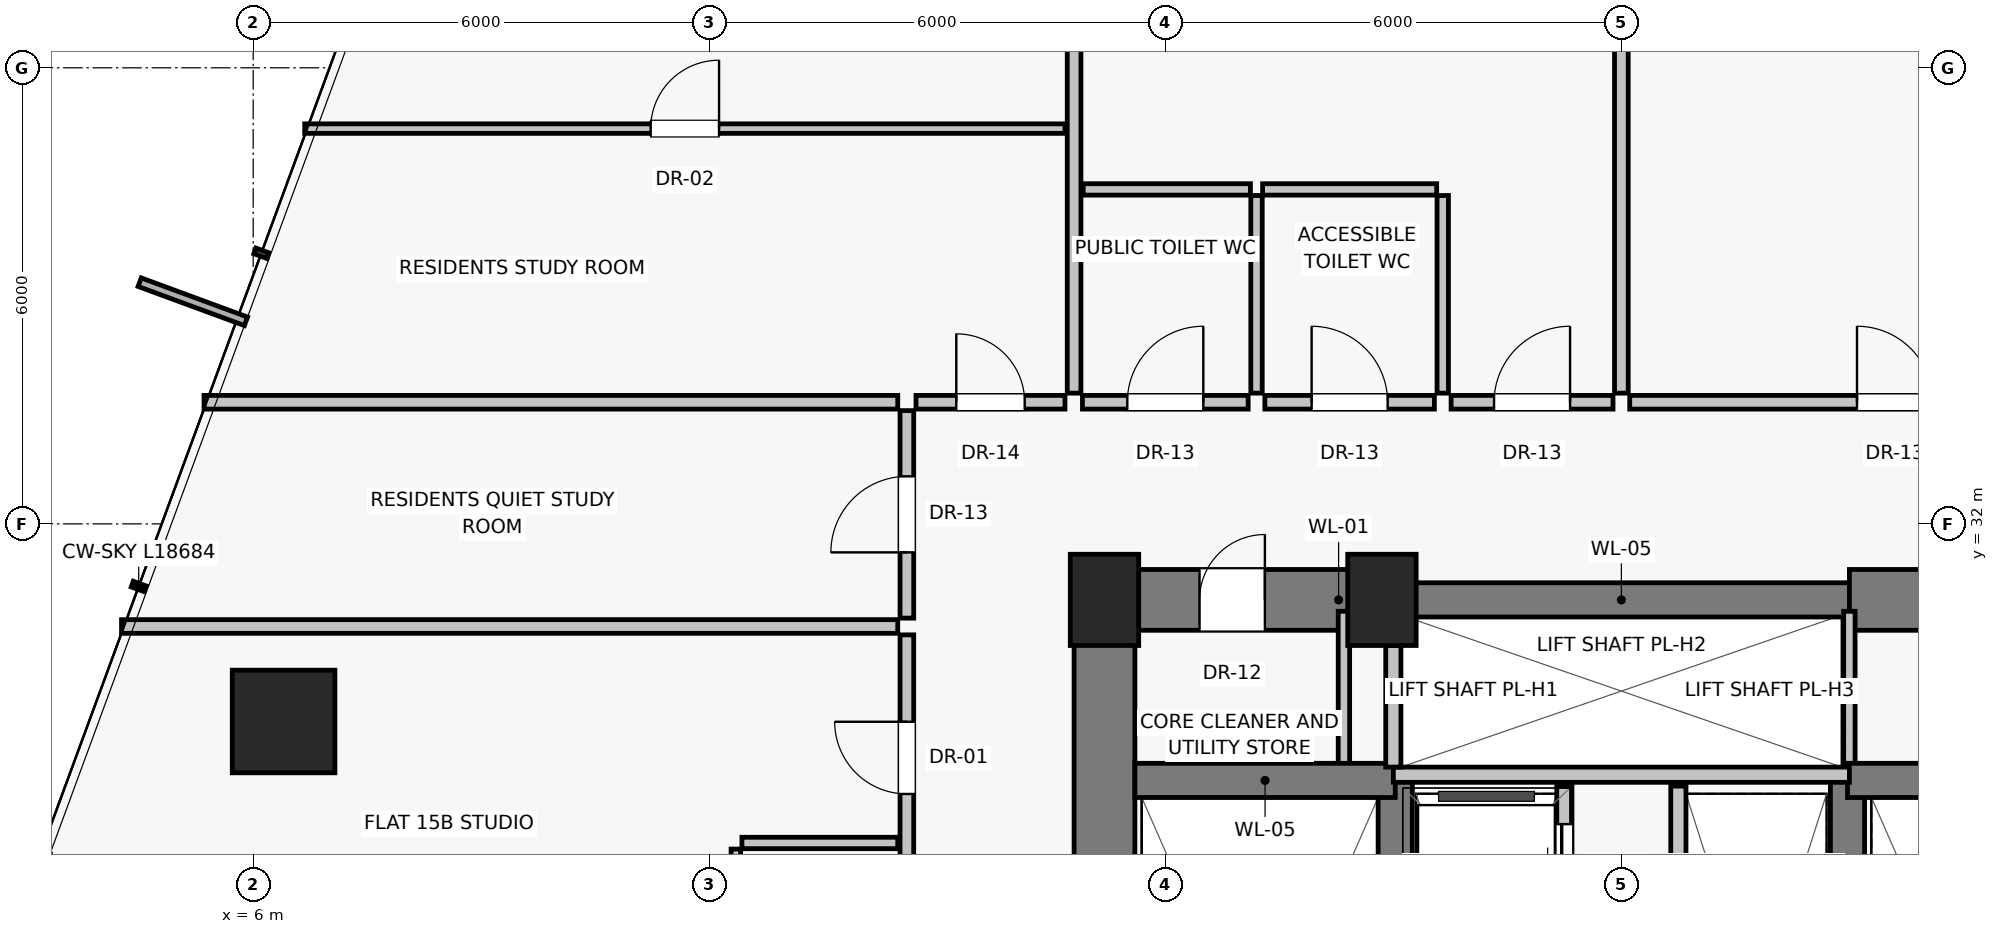
"""IFC4 building model, lengths in metres.
Left out: names, types, materials, properties, quantities, classifications, styles, units other than length and angle.
Written with IfcOpenShell. Run it as: python <this file> out.ifc"""

import sys

from ifc_helpers import new_model, si_unit, direction, frame, frame_2d, origin, origin_2d, place, context, subcontext, project, spatial, rectangle, extrude, source, transform, mapped, element, fill, save


model = new_model("IFC4")
c1 = context("Model", 3, precision=1e-05, world=origin(), true_north=direction((0.0, 1.0)))
c2 = subcontext(c1, "Body", "Model", "MODEL_VIEW")
j1 = project(units=[si_unit("LENGTHUNIT", "METRE"), si_unit("PLANEANGLEUNIT", "RADIAN")], contexts=[c1])
p1 = place(None, origin())
s1 = spatial("IfcSite", under=j1, at=p1, CompositionType="ELEMENT")
p2 = place(p1, origin())
s2 = spatial("IfcBuilding", under=s1, at=p2, CompositionType="ELEMENT")
p3 = place(p2, frame((0.0, 0.0, 56.55)))
s3 = spatial("IfcBuildingStorey", under=s2, at=p3, CompositionType="ELEMENT", Elevation=56.55)
for number, where, z_axis, x_axis in (
    (1, (17.2, 31.0, 0.0), (0.0, 0.0, 1.0), (1.0, 0.0, 0.0)),
    (2, (20.85, 31.0, 0.0), (0.0, 0.0, 1.0), (1.0, 0.0, 0.0)),
):
    element("IfcColumn", number, at=place(p3, frame(where, z_axis=z_axis, x_axis=x_axis)), inside=s3, PredefinedType="PILASTER", context=c2, shape_type="SweptSolid", body=[
        extrude(rectangle(XDim=0.9, YDim=1.2, at=origin_2d()), origin(), (0.0, 0.0, 1.0), 4.3),
    ])
p4 = place(p3, frame((6.4, 29.4, 0.0), z_axis=(0.0, 0.0, 1.0), x_axis=(1.0, 0.0, 0.0)))
e3 = element("IfcColumn", 3, at=p4, inside=s3, PredefinedType="COLUMN", context=c2, shape_type="SweptSolid", body=[
    extrude(rectangle(XDim=1.35, YDim=1.35, at=origin_2d()), origin(), (0.0, 0.0, 1.0), 4.3),
])
p5 = place(p3, frame((17.2, 16.8, 0.0), z_axis=(0.0, 0.0, 1.0), x_axis=(0.0, 1.0, 0.0)))
e4 = element("IfcWall", 4, at=p5, inside=s3, PredefinedType="SHEAR", context=c2, shape_type="SweptSolid", body=[
    extrude(rectangle(XDim=14.2, YDim=0.8, at=frame_2d((7.1, 0.0))), origin(), (0.0, 0.0, 1.0), 4.05),
])
p6 = place(p3, frame((17.2, 31.0, 0.0), z_axis=(0.0, 0.0, 1.0), x_axis=(1.0, 0.0, 0.0)))
e5 = element("IfcWall", 5, at=p6, inside=s3, PredefinedType="SHEAR", context=c2, shape_type="SweptSolid", body=[
    extrude(rectangle(XDim=3.8, YDim=0.8, at=frame_2d((1.9, 0.0))), origin(), (0.0, 0.0, 1.0), 4.05),
])
p7 = place(p6, frame((1.25, 0.0, 0.0)))
e6 = element("IfcOpeningElement", 6, at=p7, cuts=e5, PredefinedType="OPENING", context=c2, shape_type="SweptSolid", body=[
    extrude(rectangle(XDim=0.86, YDim=2.01, at=frame_2d((0.43, 1.005))), frame((0.0, 0.41, 0.0), z_axis=(0.0, -1.0, 0.0), x_axis=(1.0, 0.0, 0.0)), (0.0, 0.0, 1.0), 0.82),
])
p8 = place(p3, frame((21.0, 31.0, 0.0), z_axis=(0.0, 0.0, 1.0), x_axis=(1.0, 0.0, 0.0)))
e7 = element("IfcWall", 7, at=p8, inside=s3, PredefinedType="SHEAR", context=c2, shape_type="SweptSolid", body=[
    extrude(rectangle(XDim=6.0, YDim=0.45, at=frame_2d((3.0, 0.0))), origin(), (0.0, 0.0, 1.0), 4.05),
])
p9 = place(p3, frame((27.0, 31.0, 0.0), z_axis=(0.0, 0.0, 1.0), x_axis=(1.0, 0.0, 0.0)))
e8 = element("IfcWall", 8, at=p9, inside=s3, PredefinedType="SHEAR", context=c2, shape_type="SweptSolid", body=[
    extrude(rectangle(XDim=3.8, YDim=0.8, at=frame_2d((1.9, 0.0))), origin(), (0.0, 0.0, 1.0), 4.05),
])
p10 = place(p9, frame((1.15, 0.0, 0.0)))
e9 = element("IfcOpeningElement", 9, at=p10, cuts=e8, PredefinedType="OPENING", context=c2, shape_type="SweptSolid", body=[
    extrude(rectangle(XDim=1.0, YDim=2.01, at=frame_2d((0.5, 1.005))), frame((0.0, 0.41, 0.0), z_axis=(0.0, -1.0, 0.0), x_axis=(1.0, 0.0, 0.0)), (0.0, 0.0, 1.0), 0.82),
])
for number, where, z_axis, x_axis in (
    (10, (20.35, 28.65, 0.0), (0.0, 0.0, 1.0), (0.0, 1.0, 0.0)),
    (11, (27.0, 28.65, 0.0), (0.0, 0.0, 1.0), (0.0, 1.0, 0.0)),
):
    element("IfcWall", number, at=place(p3, frame(where, z_axis=z_axis, x_axis=x_axis)), inside=s3, PredefinedType="PARTITIONING", context=c2, shape_type="SweptSolid", body=[
        extrude(rectangle(XDim=2.2, YDim=0.15, at=frame_2d((1.1, 0.0))), origin(), (0.0, 0.0, 1.0), 4.05),
    ])
for number, where, z_axis, x_axis in (
    (12, (21.025, 19.8, 0.0), (0.0, 0.0, 1.0), (0.0, 1.0, 0.0)),
    (13, (26.975, 19.8, 0.0), (0.0, 0.0, 1.0), (0.0, 1.0, 0.0)),
):
    element("IfcWall", number, at=place(p3, frame(where, z_axis=z_axis, x_axis=x_axis)), inside=s3, PredefinedType="SHEAR", context=c2, shape_type="SweptSolid", body=[
        extrude(rectangle(XDim=8.825, YDim=0.45, at=frame_2d((4.413, 0.0))), origin(), (0.0, 0.0, 1.0), 4.05),
    ])
for number, where, z_axis, x_axis in (
    (14, (17.6, 28.625, 0.0), (0.0, 0.0, 1.0), (1.0, 0.0, 0.0)),
    (15, (26.975, 28.625, 0.0), (0.0, 0.0, 1.0), (1.0, 0.0, 0.0)),
):
    element("IfcWall", number, at=place(p3, frame(where, z_axis=z_axis, x_axis=x_axis)), inside=s3, PredefinedType="SHEAR", context=c2, shape_type="SweptSolid", body=[
        extrude(rectangle(XDim=3.425, YDim=0.45, at=frame_2d((1.712, 0.0))), origin(), (0.0, 0.0, 1.0), 4.05),
    ])
p11 = place(p3, frame((21.0, 28.7, 0.0), z_axis=(0.0, 0.0, 1.0), x_axis=(1.0, 0.0, 0.0)))
e16 = element("IfcWall", 16, at=p11, inside=s3, PredefinedType="SOLIDWALL", context=c2, shape_type="SweptSolid", body=[
    extrude(rectangle(XDim=6.0, YDim=0.2, at=frame_2d((3.0, 0.0))), origin(), (0.0, 0.0, 1.0), 4.05),
])
p12 = place(p3, frame((21.0, 28.8, 0.0), z_axis=(0.0, 0.0, 1.0), x_axis=(0.0, 1.0, 0.0)))
e17 = element("IfcWall", 17, at=p12, inside=s3, PredefinedType="SOLIDWALL", context=c2, shape_type="SweptSolid", body=[
    extrude(rectangle(XDim=1.6, YDim=0.2, at=frame_2d((0.8, 0.0))), origin(), (0.0, 0.0, 1.0), 4.05),
])
p13 = place(p3, frame((23.25, 22.6, 0.0), z_axis=(0.0, 0.0, 1.0), x_axis=(0.0, 1.0, 0.0)))
e18 = element("IfcWall", 18, at=p13, inside=s3, PredefinedType="SOLIDWALL", context=c2, shape_type="SweptSolid", body=[
    extrude(rectangle(XDim=5.95, YDim=0.2, at=frame_2d((2.975, 0.0))), origin(), (0.0, 0.0, 1.0), 4.05),
])
p14 = place(p13, frame((0.45, 0.0, 0.0)))
e19 = element("IfcOpeningElement", 19, at=p14, cuts=e18, PredefinedType="OPENING", context=c2, shape_type="SweptSolid", body=[
    extrude(rectangle(XDim=1.1, YDim=2.08, at=frame_2d((0.55, 1.04))), frame((0.0, 0.11, 0.0), z_axis=(0.0, -1.0, 0.0), x_axis=(1.0, 0.0, 0.0)), (0.0, 0.0, 1.0), 0.22),
])
p15 = place(p13, frame((2.4, 0.0, 0.0)))
e20 = element("IfcOpeningElement", 20, at=p15, cuts=e18, PredefinedType="OPENING", context=c2, shape_type="SweptSolid", body=[
    extrude(rectangle(XDim=1.1, YDim=2.08, at=frame_2d((0.55, 1.04))), frame((0.0, 0.11, 0.0), z_axis=(0.0, -1.0, 0.0), x_axis=(1.0, 0.0, 0.0)), (0.0, 0.0, 1.0), 0.22),
])
p16 = place(p13, frame((4.35, 0.0, 0.0)))
e21 = element("IfcOpeningElement", 21, at=p16, cuts=e18, PredefinedType="OPENING", context=c2, shape_type="SweptSolid", body=[
    extrude(rectangle(XDim=1.1, YDim=2.08, at=frame_2d((0.55, 1.04))), frame((0.0, 0.11, 0.0), z_axis=(0.0, -1.0, 0.0), x_axis=(1.0, 0.0, 0.0)), (0.0, 0.0, 1.0), 0.22),
])
p17 = place(p3, frame((24.75, 22.6, 0.0), z_axis=(0.0, 0.0, 1.0), x_axis=(0.0, 1.0, 0.0)))
e22 = element("IfcWall", 22, at=p17, inside=s3, PredefinedType="SOLIDWALL", context=c2, shape_type="SweptSolid", body=[
    extrude(rectangle(XDim=5.95, YDim=0.2, at=frame_2d((2.975, 0.0))), origin(), (0.0, 0.0, 1.0), 4.05),
])
p18 = place(p3, frame((16.8, 33.72, 0.0), z_axis=(0.0, 0.0, 1.0), x_axis=(0.0, 1.0, 0.0)))
e23 = element("IfcWall", 23, at=p18, inside=s3, PredefinedType="PARTITIONING", context=c2, shape_type="SweptSolid", body=[
    extrude(rectangle(XDim=10.159, YDim=0.18, at=frame_2d((5.08, 0.0))), origin(), (0.0, 0.0, 1.0), 4.05),
])
p19 = place(p3, frame((16.91, 33.6, 0.0), z_axis=(0.0, 0.0, 1.0), x_axis=(1.0, 0.0, 0.0)))
e24 = element("IfcWall", 24, at=p19, inside=s3, PredefinedType="PARTITIONING", context=c2, shape_type="SweptSolid", body=[
    extrude(rectangle(XDim=2.18, YDim=0.18, at=frame_2d((1.09, 0.0))), origin(), (0.0, 0.0, 1.0), 4.05),
])
p20 = place(p19, frame((0.59, 0.0, 0.0)))
e25 = element("IfcOpeningElement", 25, at=p20, cuts=e24, PredefinedType="OPENING", context=c2, shape_type="SweptSolid", body=[
    extrude(rectangle(XDim=1.0, YDim=2.01, at=frame_2d((0.5, 1.005))), frame((0.0, 0.1, 0.0), z_axis=(0.0, -1.0, 0.0), x_axis=(1.0, 0.0, 0.0)), (0.0, 0.0, 1.0), 0.2),
])
p21 = place(p3, frame((19.31, 33.6, 0.0), z_axis=(0.0, 0.0, 1.0), x_axis=(1.0, 0.0, 0.0)))
e26 = element("IfcWall", 26, at=p21, inside=s3, PredefinedType="PARTITIONING", context=c2, shape_type="SweptSolid", body=[
    extrude(rectangle(XDim=2.23, YDim=0.18, at=frame_2d((1.115, 0.0))), origin(), (0.0, 0.0, 1.0), 4.05),
])
p22 = place(p21, frame((0.615, 0.0, 0.0)))
e27 = element("IfcOpeningElement", 27, at=p22, cuts=e26, PredefinedType="OPENING", context=c2, shape_type="SweptSolid", body=[
    extrude(rectangle(XDim=1.0, YDim=2.01, at=frame_2d((0.5, 1.005))), frame((0.0, 0.1, 0.0), z_axis=(0.0, -1.0, 0.0), x_axis=(1.0, 0.0, 0.0)), (0.0, 0.0, 1.0), 0.2),
])
p23 = place(p3, frame((21.76, 33.6, 0.0), z_axis=(0.0, 0.0, 1.0), x_axis=(1.0, 0.0, 0.0)))
e28 = element("IfcWall", 28, at=p23, inside=s3, PredefinedType="PARTITIONING", context=c2, shape_type="SweptSolid", body=[
    extrude(rectangle(XDim=2.13, YDim=0.18, at=frame_2d((1.065, 0.0))), origin(), (0.0, 0.0, 1.0), 4.05),
])
p24 = place(p23, frame((0.565, 0.0, 0.0)))
e29 = element("IfcOpeningElement", 29, at=p24, cuts=e28, PredefinedType="OPENING", context=c2, shape_type="SweptSolid", body=[
    extrude(rectangle(XDim=1.0, YDim=2.01, at=frame_2d((0.5, 1.005))), frame((0.0, 0.1, 0.0), z_axis=(0.0, -1.0, 0.0), x_axis=(1.0, 0.0, 0.0)), (0.0, 0.0, 1.0), 0.2),
])
p25 = place(p3, frame((24.11, 33.6, 0.0), z_axis=(0.0, 0.0, 1.0), x_axis=(1.0, 0.0, 0.0)))
e30 = element("IfcWall", 30, at=p25, inside=s3, PredefinedType="PARTITIONING", context=c2, shape_type="SweptSolid", body=[
    extrude(rectangle(XDim=6.98, YDim=0.18, at=frame_2d((3.49, 0.0))), origin(), (0.0, 0.0, 1.0), 4.05),
])
p26 = place(p25, frame((2.99, 0.0, 0.0)))
e31 = element("IfcOpeningElement", 31, at=p26, cuts=e30, PredefinedType="OPENING", context=c2, shape_type="SweptSolid", body=[
    extrude(rectangle(XDim=1.0, YDim=2.01, at=frame_2d((0.5, 1.005))), frame((0.0, 0.1, 0.0), z_axis=(0.0, -1.0, 0.0), x_axis=(1.0, 0.0, 0.0)), (0.0, 0.0, 1.0), 0.2),
])
for number, where, z_axis, x_axis in (
    (32, (19.2, 33.72, 0.0), (0.0, 0.0, 1.0), (0.0, 1.0, 0.0)),
    (33, (21.65, 33.72, 0.0), (0.0, 0.0, 1.0), (0.0, 1.0, 0.0)),
):
    element("IfcWall", number, at=place(p3, frame(where, z_axis=z_axis, x_axis=x_axis)), inside=s3, PredefinedType="PARTITIONING", context=c2, shape_type="SweptSolid", body=[
        extrude(rectangle(XDim=2.6, YDim=0.15, at=frame_2d((1.3, 0.0))), origin(), (0.0, 0.0, 1.0), 4.05),
    ])
p27 = place(p3, frame((16.92, 36.4, 0.0), z_axis=(0.0, 0.0, 1.0), x_axis=(1.0, 0.0, 0.0)))
e34 = element("IfcWall", 34, at=p27, inside=s3, PredefinedType="PARTITIONING", context=c2, shape_type="SweptSolid", body=[
    extrude(rectangle(XDim=2.2, YDim=0.15, at=frame_2d((1.1, 0.0))), origin(), (0.0, 0.0, 1.0), 3.63),
])
p28 = place(p3, frame((19.28, 36.4, 0.0), z_axis=(0.0, 0.0, 1.0), x_axis=(1.0, 0.0, 0.0)))
e35 = element("IfcWall", 35, at=p28, inside=s3, PredefinedType="PARTITIONING", context=c2, shape_type="SweptSolid", body=[
    extrude(rectangle(XDim=2.29, YDim=0.15, at=frame_2d((1.145, 0.0))), origin(), (0.0, 0.0, 1.0), 3.63),
])
p29 = place(p3, frame((24.0, 33.72, 0.0), z_axis=(0.0, 0.0, 1.0), x_axis=(0.0, 1.0, 0.0)))
e36 = element("IfcWall", 36, at=p29, inside=s3, PredefinedType="PARTITIONING", context=c2, shape_type="SweptSolid", body=[
    extrude(rectangle(XDim=11.403, YDim=0.18, at=frame_2d((5.701, 0.0))), origin(), (0.0, 0.0, 1.0), 4.05),
])
p30 = place(p3, frame((14.48, 33.6, 0.0), z_axis=(0.0, 0.0, 1.0), x_axis=(-1.0, 0.0, 0.0)))
e37 = element("IfcWall", 37, at=p30, inside=s3, PredefinedType="PARTITIONING", context=c2, shape_type="SweptSolid", body=[
    extrude(rectangle(XDim=9.126, YDim=0.18, at=frame_2d((4.563, 0.0))), origin(), (0.0, 0.0, 1.0), 4.05),
])
p31 = place(p3, frame((14.6, 30.76, 0.0), z_axis=(0.0, 0.0, 1.0), x_axis=(0.0, 1.0, 0.0)))
e38 = element("IfcWall", 38, at=p31, inside=s3, PredefinedType="PARTITIONING", context=c2, shape_type="SweptSolid", body=[
    extrude(rectangle(XDim=2.73, YDim=0.18, at=frame_2d((1.365, 0.0))), origin(), (0.0, 0.0, 1.0), 4.05),
])
p32 = place(p31, frame((0.865, 0.0, 0.0)))
e39 = element("IfcOpeningElement", 39, at=p32, cuts=e38, PredefinedType="OPENING", context=c2, shape_type="SweptSolid", body=[
    extrude(rectangle(XDim=1.0, YDim=2.01, at=frame_2d((0.5, 1.005))), frame((0.0, 0.1, 0.0), z_axis=(0.0, -1.0, 0.0), x_axis=(1.0, 0.0, 0.0)), (0.0, 0.0, 1.0), 0.2),
])
p33 = place(p3, frame((14.48, 30.65, 0.0), z_axis=(0.0, 0.0, 1.0), x_axis=(-1.0, 0.0, 0.0)))
e40 = element("IfcWall", 40, at=p33, inside=s3, PredefinedType="PARTITIONING", context=c2, shape_type="SweptSolid", body=[
    extrude(rectangle(XDim=10.212, YDim=0.18, at=frame_2d((5.106, 0.0))), origin(), (0.0, 0.0, 1.0), 3.271),
])
p34 = place(p3, frame((14.6, 25.562, 0.0), z_axis=(0.0, 0.0, 1.0), x_axis=(0.0, 1.0, 0.0)))
e41 = element("IfcWall", 41, at=p34, inside=s3, PredefinedType="PARTITIONING", context=c2, shape_type="SweptSolid", body=[
    extrude(rectangle(XDim=4.978, YDim=0.18, at=frame_2d((2.489, 0.0))), origin(), (0.0, 0.0, 1.0), 4.05),
])
p35 = place(p34, frame((2.885, 0.0, 0.0)))
e42 = element("IfcOpeningElement", 42, at=p35, cuts=e41, PredefinedType="OPENING", context=c2, shape_type="SweptSolid", body=[
    extrude(rectangle(XDim=0.95, YDim=2.02, at=frame_2d((0.475, 1.01))), frame((0.0, 0.1, 0.0), z_axis=(0.0, -1.0, 0.0), x_axis=(1.0, 0.0, 0.0)), (0.0, 0.0, 1.0), 0.2),
])
p36 = place(p3, frame((14.48, 27.802, 0.0), z_axis=(0.0, 0.0, 1.0), x_axis=(-1.0, 0.0, 0.0)))
e43 = element("IfcWall", 43, at=p36, inside=s3, PredefinedType="PARTITIONING", context=c2, shape_type="SweptSolid", body=[
    extrude(rectangle(XDim=2.05, YDim=0.15, at=frame_2d((1.025, 0.0))), origin(), (0.0, 0.0, 1.0), 4.05),
])
p37 = place(p3, frame((12.35, 25.572, 0.0), z_axis=(0.0, 0.0, 1.0), x_axis=(0.0, 1.0, 0.0)))
e44 = element("IfcWall", 44, at=p37, inside=s3, PredefinedType="PARTITIONING", context=c2, shape_type="SweptSolid", body=[
    extrude(rectangle(XDim=2.15, YDim=0.125, at=frame_2d((1.075, 0.0))), origin(), (0.0, 0.0, 1.0), 4.05),
])
p38 = place(p37, frame((0.645, 0.0, 0.0)))
e45 = element("IfcOpeningElement", 45, at=p38, cuts=e44, PredefinedType="OPENING", context=c2, shape_type="SweptSolid", body=[
    extrude(rectangle(XDim=0.86, YDim=2.01, at=frame_2d((0.43, 1.005))), frame((0.0, 0.073, 0.0), z_axis=(0.0, -1.0, 0.0), x_axis=(1.0, 0.0, 0.0)), (0.0, 0.0, 1.0), 0.145),
])
p39 = place(p3, frame((14.72, 33.6, 0.0), z_axis=(0.0, 0.0, 1.0), x_axis=(1.0, 0.0, 0.0)))
e46 = element("IfcWall", 46, at=p39, inside=s3, PredefinedType="PARTITIONING", context=c2, shape_type="SweptSolid", body=[
    extrude(rectangle(XDim=1.96, YDim=0.18, at=frame_2d((0.98, 0.0))), origin(), (0.0, 0.0, 1.0), 4.05),
])
p40 = place(p39, frame((0.53, 0.0, 0.0)))
e47 = element("IfcOpeningElement", 47, at=p40, cuts=e46, PredefinedType="OPENING", context=c2, shape_type="SweptSolid", body=[
    extrude(rectangle(XDim=0.9, YDim=2.01, at=frame_2d((0.45, 1.005))), frame((0.0, 0.1, 0.0), z_axis=(0.0, -1.0, 0.0), x_axis=(1.0, 0.0, 0.0)), (0.0, 0.0, 1.0), 0.2),
])
p41 = place(p3, frame((6.678, 37.2, 0.0), z_axis=(0.0, 0.0, 1.0), x_axis=(1.0, 0.0, 0.0)))
e48 = element("IfcWall", 48, at=p41, inside=s3, PredefinedType="PARTITIONING", context=c2, shape_type="SweptSolid", body=[
    extrude(rectangle(XDim=10.002, YDim=0.125, at=frame_2d((5.001, 0.0))), origin(), (0.0, 0.0, 1.0), 4.05),
])
p42 = place(p41, frame((4.551, 0.0, 0.0)))
e49 = element("IfcOpeningElement", 49, at=p42, cuts=e48, PredefinedType="OPENING", context=c2, shape_type="SweptSolid", body=[
    extrude(rectangle(XDim=0.9, YDim=2.01, at=frame_2d((0.45, 1.005))), frame((0.0, 0.073, 0.0), z_axis=(0.0, -1.0, 0.0), x_axis=(1.0, 0.0, 0.0)), (0.0, 0.0, 1.0), 0.145),
])
m1 = source(origin(), c2, "Body", "SweptSolid", [
    extrude(rectangle(XDim=0.86, YDim=2.01, at=frame_2d((0.43, 1.005))), frame((0.0, 0.025, 0.0), z_axis=(0.0, -1.0, 0.0), x_axis=(1.0, 0.0, 0.0)), (0.0, 0.0, 1.0), 0.05),
])
p43 = place(p7, origin())
e50 = element("IfcDoor", 50, at=p43, inside=s3, OperationType="SINGLE_SWING_RIGHT", PredefinedType="DOOR", context=c2, shape_type="MappedRepresentation", body=[
    mapped(m1, transform((0.0, 0.0, 0.0), scale=1.0)),
])
fill(e6, e50)
m2 = source(origin(), c2, "Body", "SweptSolid", [
    extrude(rectangle(XDim=1.1, YDim=2.08, at=frame_2d((0.55, 1.04))), frame((0.0, 0.025, 0.0), z_axis=(0.0, -1.0, 0.0), x_axis=(1.0, 0.0, 0.0)), (0.0, 0.0, 1.0), 0.05),
])
p44 = place(p16, origin())
e51 = element("IfcDoor", 51, at=p44, inside=s3, OperationType="SLIDING_TO_LEFT", PredefinedType="DOOR", context=c2, shape_type="MappedRepresentation", body=[
    mapped(m2, transform((0.0, 0.0, 0.0), scale=1.0)),
])
fill(e21, e51)
m3 = source(origin(), c2, "Body", "SweptSolid", [
    extrude(rectangle(XDim=1.0, YDim=2.01, at=frame_2d((0.5, 1.005))), frame((0.0, 0.025, 0.0), z_axis=(0.0, -1.0, 0.0), x_axis=(1.0, 0.0, 0.0)), (0.0, 0.0, 1.0), 0.05),
])
p45 = place(p20, origin())
e52 = element("IfcDoor", 52, at=p45, inside=s3, OperationType="SINGLE_SWING_RIGHT", PredefinedType="DOOR", context=c2, shape_type="MappedRepresentation", body=[
    mapped(m3, transform((0.0, 0.0, 0.0), scale=1.0)),
])
fill(e25, e52)
p46 = place(p22, origin())
e53 = element("IfcDoor", 53, at=p46, inside=s3, OperationType="SINGLE_SWING_LEFT", PredefinedType="DOOR", context=c2, shape_type="MappedRepresentation", body=[
    mapped(m3, transform((0.0, 0.0, 0.0), scale=1.0)),
])
fill(e27, e53)
p47 = place(p24, origin())
e54 = element("IfcDoor", 54, at=p47, inside=s3, OperationType="SINGLE_SWING_RIGHT", PredefinedType="DOOR", context=c2, shape_type="MappedRepresentation", body=[
    mapped(m3, transform((0.0, 0.0, 0.0), scale=1.0)),
])
fill(e29, e54)
p48 = place(p26, origin())
e55 = element("IfcDoor", 55, at=p48, inside=s3, OperationType="SINGLE_SWING_LEFT", PredefinedType="DOOR", context=c2, shape_type="MappedRepresentation", body=[
    mapped(m3, transform((0.0, 0.0, 0.0), scale=1.0)),
])
fill(e31, e55)
p49 = place(p32, origin())
e56 = element("IfcDoor", 56, at=p49, inside=s3, OperationType="SINGLE_SWING_LEFT", PredefinedType="DOOR", context=c2, shape_type="MappedRepresentation", body=[
    mapped(m3, transform((0.0, 0.0, 0.0), scale=1.0)),
])
fill(e39, e56)
m4 = source(origin(), c2, "Body", "SweptSolid", [
    extrude(rectangle(XDim=0.95, YDim=2.02, at=frame_2d((0.475, 1.01))), frame((0.0, 0.025, 0.0), z_axis=(0.0, -1.0, 0.0), x_axis=(1.0, 0.0, 0.0)), (0.0, 0.0, 1.0), 0.05),
])
p50 = place(p35, origin())
e57 = element("IfcDoor", 57, at=p50, inside=s3, OperationType="SINGLE_SWING_RIGHT", PredefinedType="DOOR", context=c2, shape_type="MappedRepresentation", body=[
    mapped(m4, transform((0.0, 0.0, 0.0), scale=1.0)),
])
fill(e42, e57)
m5 = source(origin(), c2, "Body", "SweptSolid", [
    extrude(rectangle(XDim=0.9, YDim=2.01, at=frame_2d((0.45, 1.005))), frame((0.0, 0.025, 0.0), z_axis=(0.0, -1.0, 0.0), x_axis=(1.0, 0.0, 0.0)), (0.0, 0.0, 1.0), 0.05),
])
p51 = place(p40, origin())
e58 = element("IfcDoor", 58, at=p51, inside=s3, OperationType="SINGLE_SWING_LEFT", PredefinedType="DOOR", context=c2, shape_type="MappedRepresentation", body=[
    mapped(m5, transform((0.0, 0.0, 0.0), scale=1.0)),
])
fill(e47, e58)
p52 = place(p42, origin())
e59 = element("IfcDoor", 59, at=p52, inside=s3, OperationType="SINGLE_SWING_RIGHT", PredefinedType="DOOR", context=c2, shape_type="MappedRepresentation", body=[
    mapped(m5, transform((0.0, 0.0, 0.0), scale=1.0)),
])
fill(e49, e59)
save(model, sys.argv[1])
